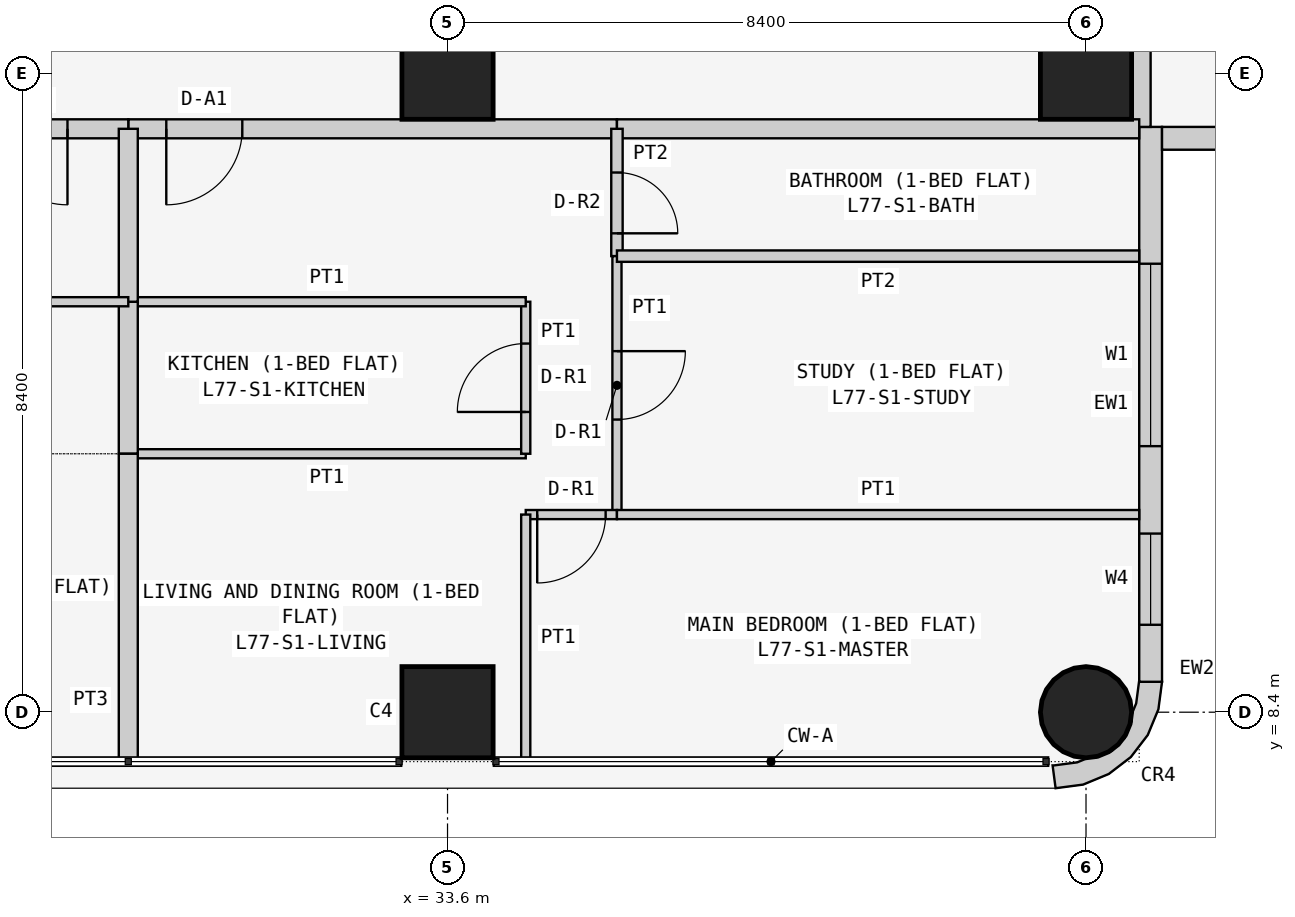
"""IFC4 building model, lengths in metres.
Left out: names, types, materials, properties, quantities, classifications, styles, units other than length and angle.
Written with IfcOpenShell. Run it as: python <this file> out.ifc"""

import sys

from ifc_helpers import new_model, si_unit, direction, frame, frame_2d, origin, origin_2d, place, context, subcontext, project, spatial, polyline, rectangle, circle, outline, extrude, element, fill, save


model = new_model("IFC4")
c1 = context("Model", 3, precision=1e-05, world=origin(), true_north=direction((0.0, 1.0)))
c2 = subcontext(c1, "Body", "Model", "MODEL_VIEW")
j1 = project(units=[si_unit("LENGTHUNIT", "METRE"), si_unit("PLANEANGLEUNIT", "RADIAN")], contexts=[c1])
p1 = place(None, origin())
s1 = spatial("IfcSite", under=j1, at=p1, CompositionType="ELEMENT")
p2 = place(p1, origin())
s2 = spatial("IfcBuilding", under=s1, at=p2, CompositionType="ELEMENT")
p3 = place(p2, frame((0.0, 0.0, 293.7)))
s3 = spatial("IfcBuildingStorey", under=s2, at=p3, CompositionType="ELEMENT", Elevation=293.7)
for number, where, z_axis, x_axis in (
    (1, (33.6, 8.4, 0.0), (0.0, 0.0, 1.0), (1.0, 0.0, 0.0)),
    (2, (33.6, 16.8, 0.0), (0.0, 0.0, 1.0), (1.0, 0.0, 0.0)),
):
    element("IfcColumn", number, at=place(p3, frame(where, z_axis=z_axis, x_axis=x_axis)), inside=s3, PredefinedType="COLUMN", context=c2, shape_type="SweptSolid", body=[
        extrude(rectangle(XDim=1.2, YDim=1.2, at=origin_2d()), origin(), (0.0, 0.0, 1.0), 3.6),
    ])
p4 = place(p3, frame((42.0, 8.4, 0.0), z_axis=(0.0, 0.0, 1.0), x_axis=(1.0, 0.0, 0.0)))
e3 = element("IfcColumn", 3, at=p4, inside=s3, PredefinedType="COLUMN", context=c2, shape_type="SweptSolid", body=[
    extrude(circle(Radius=0.6, at=origin_2d()), origin(), (0.0, 0.0, 1.0), 3.6),
])
p5 = place(p3, frame((42.0, 16.8, 0.0), z_axis=(0.0, 0.0, 1.0), x_axis=(1.0, 0.0, 0.0)))
e4 = element("IfcColumn", 4, at=p5, inside=s3, PredefinedType="COLUMN", context=c2, shape_type="SweptSolid", body=[
    extrude(rectangle(XDim=1.2, YDim=1.2, at=origin_2d()), origin(), (0.0, 0.0, 1.0), 3.6),
])
p6 = place(p3, frame((42.85, 8.8, 0.0), z_axis=(0.0, 0.0, 1.0), x_axis=(0.0, 1.0, 0.0)))
e5 = element("IfcWall", 5, at=p6, inside=s3, PredefinedType="SOLIDWALL", context=c2, shape_type="SweptSolid", body=[
    extrude(rectangle(XDim=7.3, YDim=0.3, at=frame_2d((3.65, 0.0))), origin(), (0.0, 0.0, 1.0), 3.45),
])
p7 = place(p6, frame((3.1, 0.0, 0.9)))
e6 = element("IfcOpeningElement", 6, at=p7, cuts=e5, PredefinedType="OPENING", context=c2, shape_type="SweptSolid", body=[
    extrude(rectangle(XDim=2.4, YDim=1.5, at=frame_2d((1.2, 0.75))), frame((0.0, 0.16, 0.0), z_axis=(0.0, -1.0, 0.0), x_axis=(1.0, 0.0, 0.0)), (0.0, 0.0, 1.0), 0.32),
])
p8 = place(p6, frame((0.75, 0.0, 0.9)))
e7 = element("IfcOpeningElement", 7, at=p8, cuts=e5, PredefinedType="OPENING", context=c2, shape_type="SweptSolid", body=[
    extrude(rectangle(XDim=1.2, YDim=1.5, at=frame_2d((0.6, 0.75))), frame((0.0, 0.16, 0.0), z_axis=(0.0, -1.0, 0.0), x_axis=(1.0, 0.0, 0.0)), (0.0, 0.0, 1.0), 0.32),
])
p9 = place(p3, frame((43.0, 15.95, 0.0), z_axis=(0.0, 0.0, 1.0), x_axis=(1.0, 0.0, 0.0)))
e8 = element("IfcWall", 8, at=p9, inside=s3, PredefinedType="SOLIDWALL", context=c2, shape_type="SweptSolid", body=[
    extrude(rectangle(XDim=7.0, YDim=0.3, at=frame_2d((3.5, 0.0))), origin(), (0.0, 0.0, 1.0), 3.45),
])
p10 = place(p9, frame((1.5, 0.0, 0.9)))
e9 = element("IfcOpeningElement", 9, at=p10, cuts=e8, PredefinedType="OPENING", context=c2, shape_type="SweptSolid", body=[
    extrude(rectangle(XDim=2.4, YDim=1.5, at=frame_2d((1.2, 0.75))), frame((0.0, 0.16, 0.0), z_axis=(0.0, -1.0, 0.0), x_axis=(1.0, 0.0, 0.0)), (0.0, 0.0, 1.0), 0.32),
])
p11 = place(p9, frame((5.05, 0.0, 0.9)))
e10 = element("IfcOpeningElement", 10, at=p11, cuts=e8, PredefinedType="OPENING", context=c2, shape_type="SweptSolid", body=[
    extrude(rectangle(XDim=1.2, YDim=1.5, at=frame_2d((0.6, 0.75))), frame((0.0, 0.16, 0.0), z_axis=(0.0, -1.0, 0.0), x_axis=(1.0, 0.0, 0.0)), (0.0, 0.0, 1.0), 0.32),
])
p12 = place(p3, frame((41.638, 7.824, 0.0), z_axis=(0.0, 0.0, 1.0), x_axis=(0.707106781187, -0.707106781187, 0.0)))
e11 = element("IfcWall", 11, at=p12, inside=s3, PredefinedType="SOLIDWALL", context=c2, shape_type="SweptSolid", body=[
    extrude(outline(polyline([(0.033, 1.469), (0.047, 1.455), (0.233, 1.212), (0.292, 1.069), (0.358, 1.003), (0.449, 0.782), (0.449, 0.543), (0.358, 0.322), (0.292, 0.257), (0.233, 0.114), (0.047, -0.129), (0.033, -0.143), (0.273, -0.327), (0.495, -0.037), (0.635, 0.301), (0.683, 0.663), (0.635, 1.025), (0.495, 1.363), (0.273, 1.653), (0.033, 1.469)])), origin(), (0.0, 0.0, 1.0), 3.45),
])
p13 = place(p3, frame((42.725, 20.686, 0.0), z_axis=(0.0, 0.0, 1.0), x_axis=(0.0, -1.0, 0.0)))
e12 = element("IfcWall", 12, at=p13, inside=s3, PredefinedType="PARTITIONING", context=c2, shape_type="SweptSolid", body=[
    extrude(rectangle(XDim=4.586, YDim=0.25, at=frame_2d((2.293, 0.0))), origin(), (0.0, 0.0, 1.0), 3.45),
])
p14 = place(p3, frame((35.829, 16.075, 0.0), z_axis=(0.0, 0.0, 1.0), x_axis=(-1.0, 0.0, 0.0)))
e13 = element("IfcWall", 13, at=p14, inside=s3, PredefinedType="PARTITIONING", context=c2, shape_type="SweptSolid", body=[
    extrude(rectangle(XDim=6.429, YDim=0.25, at=frame_2d((3.215, 0.0))), origin(), (0.0, 0.0, 1.0), 3.45),
])
p15 = place(p14, frame((4.929, 0.0, 0.0)))
e14 = element("IfcOpeningElement", 14, at=p15, cuts=e13, PredefinedType="OPENING", context=c2, shape_type="SweptSolid", body=[
    extrude(rectangle(XDim=1.0, YDim=2.1, at=frame_2d((0.5, 1.05))), frame((0.0, 0.135, 0.0), z_axis=(0.0, -1.0, 0.0), x_axis=(1.0, 0.0, 0.0)), (0.0, 0.0, 1.0), 0.27),
])
p16 = place(p3, frame((42.7, 16.075, 0.0), z_axis=(0.0, 0.0, 1.0), x_axis=(-1.0, 0.0, 0.0)))
e15 = element("IfcWall", 15, at=p16, inside=s3, PredefinedType="PARTITIONING", context=c2, shape_type="SweptSolid", body=[
    extrude(rectangle(XDim=6.871, YDim=0.25, at=frame_2d((3.436, 0.0))), origin(), (0.0, 0.0, 1.0), 3.45),
])
p17 = place(p3, frame((29.4, 16.075, 0.0), z_axis=(0.0, 0.0, 1.0), x_axis=(-1.0, 0.0, 0.0)))
e16 = element("IfcWall", 16, at=p17, inside=s3, PredefinedType="PARTITIONING", context=c2, shape_type="SweptSolid", body=[
    extrude(rectangle(XDim=7.5, YDim=0.25, at=frame_2d((3.75, 0.0))), origin(), (0.0, 0.0, 1.0), 3.45),
])
p18 = place(p17, frame((0.8, 0.0, 0.0)))
e17 = element("IfcOpeningElement", 17, at=p18, cuts=e16, PredefinedType="OPENING", context=c2, shape_type="SweptSolid", body=[
    extrude(rectangle(XDim=1.0, YDim=2.1, at=frame_2d((0.5, 1.05))), frame((0.0, 0.135, 0.0), z_axis=(0.0, -1.0, 0.0), x_axis=(1.0, 0.0, 0.0)), (0.0, 0.0, 1.0), 0.27),
])
p19 = place(p3, frame((29.4, 11.8, 0.0), z_axis=(0.0, 0.0, 1.0), x_axis=(1.0, 0.0, 0.0)))
e18 = element("IfcWall", 18, at=p19, inside=s3, PredefinedType="PARTITIONING", context=c2, shape_type="SweptSolid", body=[
    extrude(rectangle(XDim=5.229, YDim=0.12, at=frame_2d((2.615, 0.0))), origin(), (0.0, 0.0, 1.0), 3.45),
])
p20 = place(p3, frame((34.629, 11.8, 0.0), z_axis=(0.0, 0.0, 1.0), x_axis=(0.0, 1.0, 0.0)))
e19 = element("IfcWall", 19, at=p20, inside=s3, PredefinedType="PARTITIONING", context=c2, shape_type="SweptSolid", body=[
    extrude(rectangle(XDim=2.0, YDim=0.12, at=frame_2d((1.0, 0.0))), origin(), (0.0, 0.0, 1.0), 3.45),
])
p21 = place(p20, frame((0.55, 0.0, 0.0)))
e20 = element("IfcOpeningElement", 20, at=p21, cuts=e19, PredefinedType="OPENING", context=c2, shape_type="SweptSolid", body=[
    extrude(rectangle(XDim=0.9, YDim=2.1, at=frame_2d((0.45, 1.05))), frame((0.0, 0.07, 0.0), z_axis=(0.0, -1.0, 0.0), x_axis=(1.0, 0.0, 0.0)), (0.0, 0.0, 1.0), 0.14),
])
p22 = place(p3, frame((34.629, 13.8, 0.0), z_axis=(0.0, 0.0, 1.0), x_axis=(-1.0, 0.0, 0.0)))
e21 = element("IfcWall", 21, at=p22, inside=s3, PredefinedType="PARTITIONING", context=c2, shape_type="SweptSolid", body=[
    extrude(rectangle(XDim=5.229, YDim=0.12, at=frame_2d((2.615, 0.0))), origin(), (0.0, 0.0, 1.0), 3.45),
])
p23 = place(p3, frame((29.4, 13.8, 0.0), z_axis=(0.0, 0.0, 1.0), x_axis=(0.0, -1.0, 0.0)))
e22 = element("IfcWall", 22, at=p23, inside=s3, PredefinedType="PARTITIONING", context=c2, shape_type="SweptSolid", body=[
    extrude(rectangle(XDim=2.0, YDim=0.25, at=frame_2d((1.0, 0.0))), origin(), (0.0, 0.0, 1.0), 2.848),
])
p24 = place(p3, frame((35.829, 16.075, 0.0), z_axis=(0.0, 0.0, 1.0), x_axis=(0.0, -1.0, 0.0)))
e23 = element("IfcWall", 23, at=p24, inside=s3, PredefinedType="PARTITIONING", context=c2, shape_type="SweptSolid", body=[
    extrude(rectangle(XDim=1.675, YDim=0.15, at=frame_2d((0.837, 0.0))), origin(), (0.0, 0.0, 1.0), 3.45),
])
p25 = place(p24, frame((0.575, 0.0, 0.0)))
e24 = element("IfcOpeningElement", 24, at=p25, cuts=e23, PredefinedType="OPENING", context=c2, shape_type="SweptSolid", body=[
    extrude(rectangle(XDim=0.8, YDim=2.1, at=frame_2d((0.4, 1.05))), frame((0.0, 0.085, 0.0), z_axis=(0.0, -1.0, 0.0), x_axis=(1.0, 0.0, 0.0)), (0.0, 0.0, 1.0), 0.17),
])
p26 = place(p3, frame((35.829, 14.4, 0.0), z_axis=(0.0, 0.0, 1.0), x_axis=(0.0, -1.0, 0.0)))
e25 = element("IfcWall", 25, at=p26, inside=s3, PredefinedType="PARTITIONING", context=c2, shape_type="SweptSolid", body=[
    extrude(rectangle(XDim=3.4, YDim=0.12, at=frame_2d((1.7, 0.0))), origin(), (0.0, 0.0, 1.0), 3.45),
])
p27 = place(p26, frame((1.25, 0.0, 0.0)))
e26 = element("IfcOpeningElement", 26, at=p27, cuts=e25, PredefinedType="OPENING", context=c2, shape_type="SweptSolid", body=[
    extrude(rectangle(XDim=0.9, YDim=2.1, at=frame_2d((0.45, 1.05))), frame((0.0, 0.07, 0.0), z_axis=(0.0, -1.0, 0.0), x_axis=(1.0, 0.0, 0.0)), (0.0, 0.0, 1.0), 0.14),
])
p28 = place(p3, frame((35.829, 11.0, 0.0), z_axis=(0.0, 0.0, 1.0), x_axis=(-1.0, 0.0, 0.0)))
e27 = element("IfcWall", 27, at=p28, inside=s3, PredefinedType="PARTITIONING", context=c2, shape_type="SweptSolid", body=[
    extrude(rectangle(XDim=1.2, YDim=0.12, at=frame_2d((0.6, 0.0))), origin(), (0.0, 0.0, 1.0), 3.45),
])
p29 = place(p28, frame((0.149, 0.0, 0.0)))
e28 = element("IfcOpeningElement", 28, at=p29, cuts=e27, PredefinedType="OPENING", context=c2, shape_type="SweptSolid", body=[
    extrude(rectangle(XDim=0.9, YDim=2.1, at=frame_2d((0.45, 1.05))), frame((0.0, 0.07, 0.0), z_axis=(0.0, -1.0, 0.0), x_axis=(1.0, 0.0, 0.0)), (0.0, 0.0, 1.0), 0.14),
])
p30 = place(p3, frame((34.629, 11.0, 0.0), z_axis=(0.0, 0.0, 1.0), x_axis=(0.0, -1.0, 0.0)))
e29 = element("IfcWall", 29, at=p30, inside=s3, PredefinedType="PARTITIONING", context=c2, shape_type="SweptSolid", body=[
    extrude(rectangle(XDim=3.25, YDim=0.12, at=frame_2d((1.625, 0.0))), origin(), (0.0, 0.0, 1.0), 3.45),
])
p31 = place(p3, frame((29.4, 13.8, 0.0), z_axis=(0.0, 0.0, 1.0), x_axis=(0.0, 1.0, 0.0)))
e30 = element("IfcWall", 30, at=p31, inside=s3, PredefinedType="PARTITIONING", context=c2, shape_type="SweptSolid", body=[
    extrude(rectangle(XDim=2.275, YDim=0.25, at=frame_2d((1.137, 0.0))), origin(), (0.0, 0.0, 1.0), 2.848),
])
p32 = place(p3, frame((29.4, 7.75, 0.0), z_axis=(0.0, 0.0, 1.0), x_axis=(0.0, 1.0, 0.0)))
e31 = element("IfcWall", 31, at=p32, inside=s3, PredefinedType="PARTITIONING", context=c2, shape_type="SweptSolid", body=[
    extrude(rectangle(XDim=4.05, YDim=0.25, at=frame_2d((2.025, 0.0))), origin(), (0.0, 0.0, 1.0), 2.848),
])
p33 = place(p3, frame((35.829, 14.4, 0.0), z_axis=(0.0, 0.0, 1.0), x_axis=(1.0, 0.0, 0.0)))
e32 = element("IfcWall", 32, at=p33, inside=s3, PredefinedType="PARTITIONING", context=c2, shape_type="SweptSolid", body=[
    extrude(rectangle(XDim=6.871, YDim=0.15, at=frame_2d((3.436, 0.0))), origin(), (0.0, 0.0, 1.0), 3.45),
])
p34 = place(p3, frame((35.829, 11.0, 0.0), z_axis=(0.0, 0.0, 1.0), x_axis=(1.0, 0.0, 0.0)))
e33 = element("IfcWall", 33, at=p34, inside=s3, PredefinedType="PARTITIONING", context=c2, shape_type="SweptSolid", body=[
    extrude(rectangle(XDim=6.871, YDim=0.12, at=frame_2d((3.436, 0.0))), origin(), (0.0, 0.0, 1.0), 3.45),
])
p35 = place(p3, frame((29.4, 13.8, 0.0), z_axis=(0.0, 0.0, 1.0), x_axis=(-1.0, 0.0, 0.0)))
e34 = element("IfcWall", 34, at=p35, inside=s3, PredefinedType="PARTITIONING", context=c2, shape_type="SweptSolid", body=[
    extrude(rectangle(XDim=4.5, YDim=0.12, at=frame_2d((2.25, 0.0))), origin(), (0.0, 0.0, 1.0), 3.45),
])
p36 = place(p35, frame((1.55, 0.0, 0.0)))
e35 = element("IfcOpeningElement", 35, at=p36, cuts=e34, PredefinedType="OPENING", context=c2, shape_type="SweptSolid", body=[
    extrude(rectangle(XDim=0.9, YDim=2.1, at=frame_2d((0.45, 1.05))), frame((0.0, 0.07, 0.0), z_axis=(0.0, -1.0, 0.0), x_axis=(1.0, 0.0, 0.0)), (0.0, 0.0, 1.0), 0.14),
])
p37 = place(p7, origin())
e36 = element("IfcWindow", 36, at=p37, inside=s3, PartitioningType="SINGLE_PANEL", PredefinedType="WINDOW", context=c2, shape_type="SweptSolid", body=[
    extrude(rectangle(XDim=2.4, YDim=1.5, at=frame_2d((1.2, 0.75))), frame((0.0, 0.03, 0.0), z_axis=(0.0, -1.0, 0.0), x_axis=(1.0, 0.0, 0.0)), (0.0, 0.0, 1.0), 0.06),
])
fill(e6, e36)
p38 = place(p8, origin())
e37 = element("IfcWindow", 37, at=p38, inside=s3, PartitioningType="SINGLE_PANEL", PredefinedType="WINDOW", context=c2, shape_type="SweptSolid", body=[
    extrude(rectangle(XDim=1.2, YDim=1.5, at=frame_2d((0.6, 0.75))), frame((0.0, 0.03, 0.0), z_axis=(0.0, -1.0, 0.0), x_axis=(1.0, 0.0, 0.0)), (0.0, 0.0, 1.0), 0.06),
])
fill(e7, e37)
p39 = place(p15, origin())
e38 = element("IfcDoor", 38, at=p39, inside=s3, OperationType="SINGLE_SWING_RIGHT", PredefinedType="DOOR", context=c2, shape_type="SweptSolid", body=[
    extrude(rectangle(XDim=1.0, YDim=2.1, at=frame_2d((0.5, 1.05))), frame((0.0, 0.025, 0.0), z_axis=(0.0, -1.0, 0.0), x_axis=(1.0, 0.0, 0.0)), (0.0, 0.0, 1.0), 0.05),
])
fill(e14, e38)
p40 = place(p21, origin())
e39 = element("IfcDoor", 39, at=p40, inside=s3, OperationType="SINGLE_SWING_LEFT", PredefinedType="DOOR", context=c2, shape_type="SweptSolid", body=[
    extrude(rectangle(XDim=0.9, YDim=2.1, at=frame_2d((0.45, 1.05))), frame((0.0, 0.025, 0.0), z_axis=(0.0, -1.0, 0.0), x_axis=(1.0, 0.0, 0.0)), (0.0, 0.0, 1.0), 0.05),
])
fill(e20, e39)
p41 = place(p25, origin())
e40 = element("IfcDoor", 40, at=p41, inside=s3, OperationType="SINGLE_SWING_RIGHT", PredefinedType="DOOR", context=c2, shape_type="SweptSolid", body=[
    extrude(rectangle(XDim=0.8, YDim=2.1, at=frame_2d((0.4, 1.05))), frame((0.0, 0.025, 0.0), z_axis=(0.0, -1.0, 0.0), x_axis=(1.0, 0.0, 0.0)), (0.0, 0.0, 1.0), 0.05),
])
fill(e24, e40)
p42 = place(p27, origin())
e41 = element("IfcDoor", 41, at=p42, inside=s3, OperationType="SINGLE_SWING_LEFT", PredefinedType="DOOR", context=c2, shape_type="SweptSolid", body=[
    extrude(rectangle(XDim=0.9, YDim=2.1, at=frame_2d((0.45, 1.05))), frame((0.0, 0.025, 0.0), z_axis=(0.0, -1.0, 0.0), x_axis=(1.0, 0.0, 0.0)), (0.0, 0.0, 1.0), 0.05),
])
fill(e26, e41)
p43 = place(p29, origin())
e42 = element("IfcDoor", 42, at=p43, inside=s3, OperationType="SINGLE_SWING_RIGHT", PredefinedType="DOOR", context=c2, shape_type="SweptSolid", body=[
    extrude(rectangle(XDim=0.9, YDim=2.1, at=frame_2d((0.45, 1.05))), frame((0.0, 0.025, 0.0), z_axis=(0.0, -1.0, 0.0), x_axis=(1.0, 0.0, 0.0)), (0.0, 0.0, 1.0), 0.05),
])
fill(e28, e42)
p44 = place(p18, origin())
e43 = element("IfcDoor", 43, at=p44, inside=s3, OperationType="SINGLE_SWING_LEFT", PredefinedType="DOOR", context=c2, shape_type="SweptSolid", body=[
    extrude(rectangle(XDim=1.0, YDim=2.1, at=frame_2d((0.5, 1.05))), frame((0.0, 0.025, 0.0), z_axis=(0.0, -1.0, 0.0), x_axis=(1.0, 0.0, 0.0)), (0.0, 0.0, 1.0), 0.05),
])
fill(e17, e43)
save(model, sys.argv[1])
